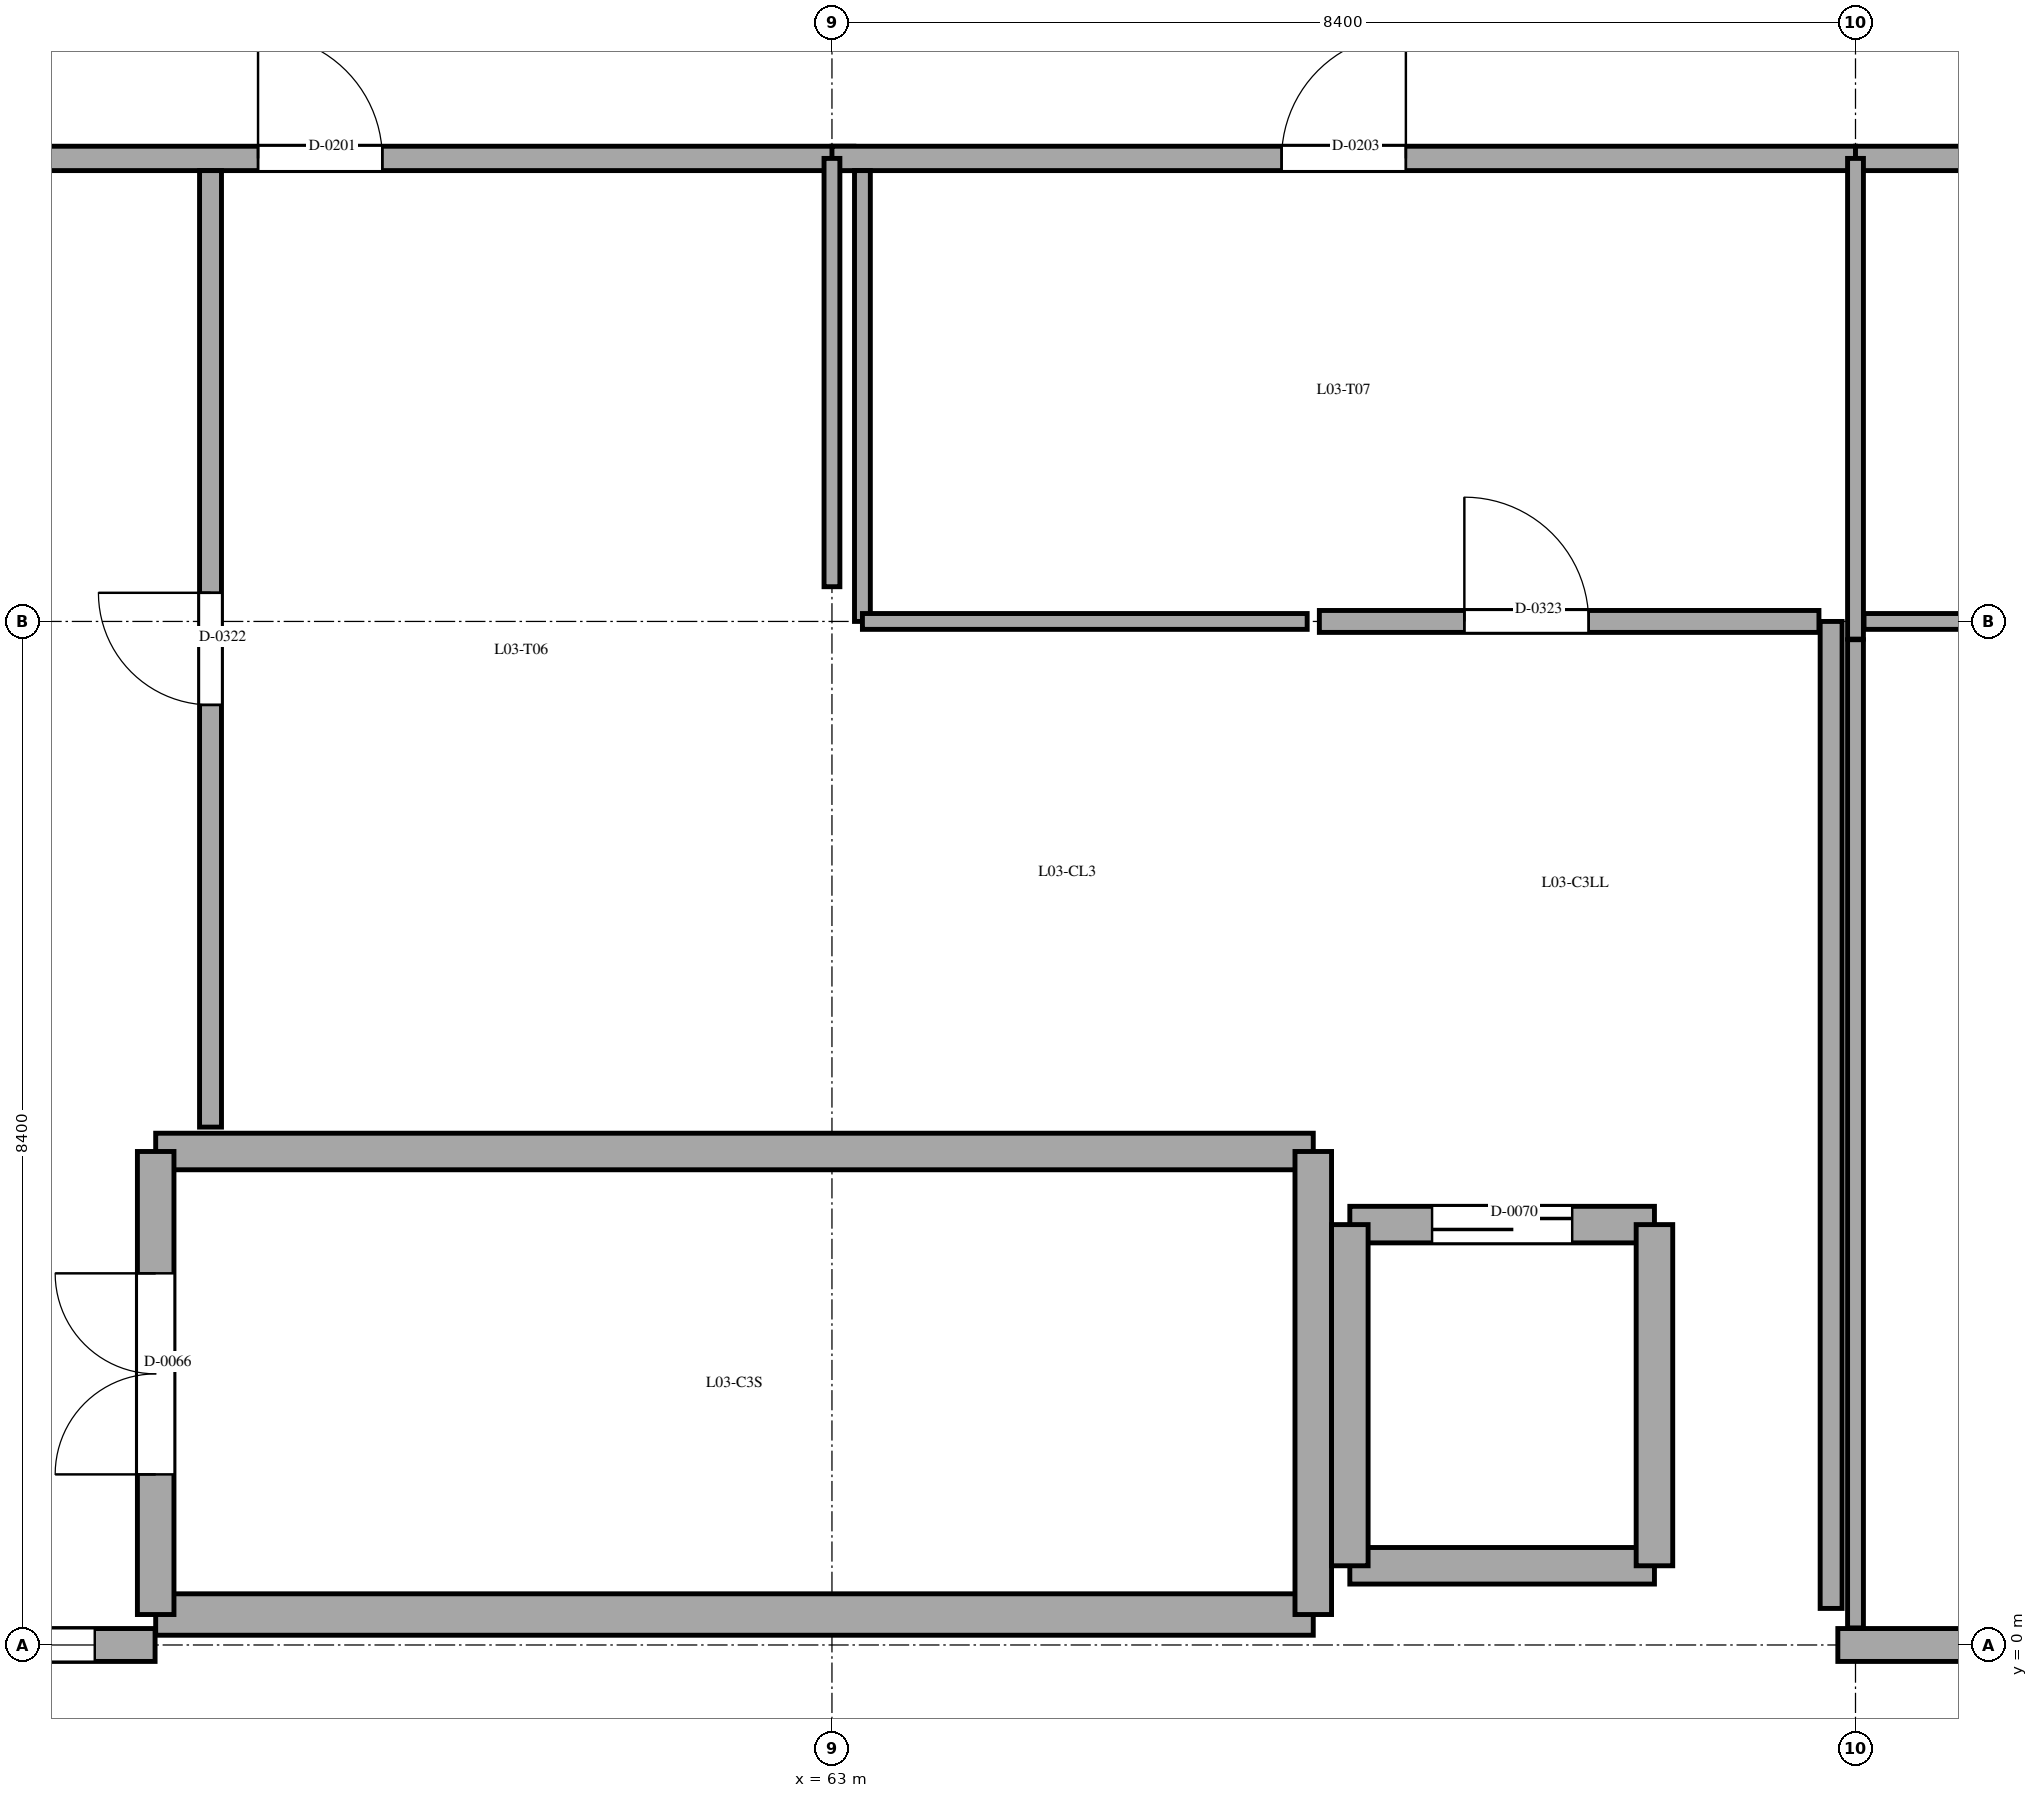
"""IFC4 building model, lengths in metres.
Left out: names, types, materials, properties, quantities, classifications, styles, units other than length and angle.
Written with IfcOpenShell. Run it as: python <this file> out.ifc"""

import sys

from ifc_helpers import new_model, si_unit, direction, frame, frame_2d, origin, origin_2d, place, context, subcontext, project, spatial, rectangle, i_section, extrude, element, fill, save


model = new_model("IFC4")
c1 = context("Model", 3, precision=1e-05, world=origin(), true_north=direction((0.0, 1.0)))
c2 = subcontext(c1, "Body", "Model", "MODEL_VIEW")
j1 = project(units=[si_unit("LENGTHUNIT", "METRE"), si_unit("PLANEANGLEUNIT", "RADIAN")], contexts=[c1])
p1 = place(None, origin())
s1 = spatial("IfcSite", under=j1, at=p1, CompositionType="ELEMENT")
p2 = place(p1, origin())
s2 = spatial("IfcBuilding", under=s1, at=p2, CompositionType="ELEMENT")
p3 = place(p2, frame((0.0, 0.0, 15.9)))
s3 = spatial("IfcBuildingStorey", under=s2, at=p3, CompositionType="ELEMENT", Elevation=15.9)
for number, where, z_axis, x_axis in (
    (1, (63.0, 0.0, 0.0), (0.0, 0.0, 1.0), (1.0, 0.0, 0.0)),
    (2, (63.0, 8.4, 0.0), (0.0, 0.0, 1.0), (1.0, 0.0, 0.0)),
):
    element("IfcColumn", number, at=place(p3, frame(where, z_axis=z_axis, x_axis=x_axis)), inside=s3, PredefinedType="COLUMN", context=c2, shape_type="SweptSolid", body=[
        extrude(rectangle(XDim=0.55, YDim=0.55, at=origin_2d()), origin(), (0.0, 0.0, 1.0), 3.9),
    ])
for number, where, z_axis, x_axis in (
    (3, (71.4, 0.0, 0.0), (0.0, 0.0, 1.0), (1.0, 0.0, 0.0)),
    (4, (71.4, 8.4, 0.0), (0.0, 0.0, 1.0), (1.0, 0.0, 0.0)),
):
    element("IfcColumn", number, at=place(p3, frame(where, z_axis=z_axis, x_axis=x_axis)), inside=s3, PredefinedType="COLUMN", context=c2, shape_type="SweptSolid", body=[
        extrude(i_section(OverallWidth=0.28, OverallDepth=0.28, WebThickness=0.01, FlangeThickness=0.018, FilletRadius=0.024, at=origin_2d()), origin(), (0.0, 0.0, 1.0), 3.9),
    ])
p4 = place(p3, frame((66.95, 0.25, 0.0), z_axis=(0.0, 0.0, 1.0), x_axis=(-1.0, 0.0, 0.0)))
e5 = element("IfcWall", 5, at=p4, inside=s3, PredefinedType="STANDARD", context=c2, shape_type="SweptSolid", body=[
    extrude(rectangle(XDim=9.5, YDim=0.34, at=frame_2d((4.75, 0.0))), origin(), (0.0, 0.0, 1.0), 3.3),
])
p5 = place(p3, frame((57.45, 4.05, 0.0), z_axis=(0.0, 0.0, 1.0), x_axis=(1.0, 0.0, 0.0)))
e6 = element("IfcWall", 6, at=p5, inside=s3, PredefinedType="SHEAR", context=c2, shape_type="SweptSolid", body=[
    extrude(rectangle(XDim=9.5, YDim=0.3, at=frame_2d((4.75, 0.0))), origin(), (0.0, 0.0, 1.0), 3.3),
])
p6 = place(p3, frame((57.45, 0.25, 0.0), z_axis=(0.0, 0.0, 1.0), x_axis=(0.0, 1.0, 0.0)))
e7 = element("IfcWall", 7, at=p6, inside=s3, PredefinedType="SHEAR", context=c2, shape_type="SweptSolid", body=[
    extrude(rectangle(XDim=3.8, YDim=0.3, at=frame_2d((1.9, 0.0))), origin(), (0.0, 0.0, 1.0), 3.3),
])
p7 = place(p6, frame((1.15, 0.0, 0.0)))
e8 = element("IfcOpeningElement", 8, at=p7, cuts=e7, PredefinedType="OPENING", context=c2, shape_type="SweptSolid", body=[
    extrude(rectangle(XDim=1.65, YDim=2.2, at=frame_2d((0.825, 1.1))), frame((0.0, 0.16, 0.0), z_axis=(0.0, -1.0, 0.0), x_axis=(1.0, 0.0, 0.0)), (0.0, 0.0, 1.0), 0.32),
])
p8 = place(p3, frame((66.95, 0.25, 0.0), z_axis=(0.0, 0.0, 1.0), x_axis=(0.0, 1.0, 0.0)))
e9 = element("IfcWall", 9, at=p8, inside=s3, PredefinedType="SHEAR", context=c2, shape_type="SweptSolid", body=[
    extrude(rectangle(XDim=3.8, YDim=0.3, at=frame_2d((1.9, 0.0))), origin(), (0.0, 0.0, 1.0), 3.3),
])
p9 = place(p3, frame((67.25, 0.65, 0.0), z_axis=(0.0, 0.0, 1.0), x_axis=(1.0, 0.0, 0.0)))
e10 = element("IfcWall", 10, at=p9, inside=s3, PredefinedType="SHEAR", context=c2, shape_type="SweptSolid", body=[
    extrude(rectangle(XDim=2.5, YDim=0.3, at=frame_2d((1.25, 0.0))), origin(), (0.0, 0.0, 1.0), 3.4),
])
p10 = place(p3, frame((67.25, 3.45, 0.0), z_axis=(0.0, 0.0, 1.0), x_axis=(1.0, 0.0, 0.0)))
e11 = element("IfcWall", 11, at=p10, inside=s3, PredefinedType="SHEAR", context=c2, shape_type="SweptSolid", body=[
    extrude(rectangle(XDim=2.5, YDim=0.3, at=frame_2d((1.25, 0.0))), origin(), (0.0, 0.0, 1.0), 3.4),
])
p11 = place(p10, frame((0.675, 0.0, 0.0)))
e12 = element("IfcOpeningElement", 12, at=p11, cuts=e11, PredefinedType="OPENING", context=c2, shape_type="SweptSolid", body=[
    extrude(rectangle(XDim=1.15, YDim=2.2, at=frame_2d((0.575, 1.1))), frame((0.0, 0.16, 0.0), z_axis=(0.0, -1.0, 0.0), x_axis=(1.0, 0.0, 0.0)), (0.0, 0.0, 1.0), 0.32),
])
for number, where, z_axis, x_axis in (
    (13, (67.25, 0.65, 0.0), (0.0, 0.0, 1.0), (0.0, 1.0, 0.0)),
    (14, (69.75, 0.65, 0.0), (0.0, 0.0, 1.0), (0.0, 1.0, 0.0)),
):
    element("IfcWall", number, at=place(p3, frame(where, z_axis=z_axis, x_axis=x_axis)), inside=s3, PredefinedType="SHEAR", context=c2, shape_type="SweptSolid", body=[
        extrude(rectangle(XDim=2.8, YDim=0.3, at=frame_2d((1.4, 0.0))), origin(), (0.0, 0.0, 1.0), 3.4),
    ])
p12 = place(p3, frame((57.445, 0.0, 0.0), z_axis=(0.0, 0.0, 1.0), x_axis=(-1.0, 0.0, 0.0)))
e15 = element("IfcWall", 15, at=p12, inside=s3, PredefinedType="STANDARD", context=c2, shape_type="SweptSolid", body=[
    extrude(rectangle(XDim=2.58, YDim=0.27, at=frame_2d((1.29, 0.0))), origin(), (0.0, 0.0, 1.0), 3.64),
])
p13 = place(p12, frame((0.495, 0.0, 0.95)))
e16 = element("IfcOpeningElement", 16, at=p13, cuts=e15, PredefinedType="OPENING", context=c2, shape_type="SweptSolid", body=[
    extrude(rectangle(XDim=1.5, YDim=1.6, at=frame_2d((0.75, 0.8))), frame((0.0, 0.145, 0.0), z_axis=(0.0, -1.0, 0.0), x_axis=(1.0, 0.0, 0.0)), (0.0, 0.0, 1.0), 0.29),
])
p14 = place(p3, frame((79.67, 0.0, 0.0), z_axis=(0.0, 0.0, 1.0), x_axis=(-1.0, 0.0, 0.0)))
e17 = element("IfcWall", 17, at=p14, inside=s3, PredefinedType="STANDARD", context=c2, shape_type="SweptSolid", body=[
    extrude(rectangle(XDim=8.415, YDim=0.27, at=frame_2d((4.208, 0.0))), origin(), (0.0, 0.0, 1.0), 3.64),
])
p15 = place(p14, frame((0.52, 0.0, 0.9)))
e18 = element("IfcOpeningElement", 18, at=p15, cuts=e17, PredefinedType="OPENING", context=c2, shape_type="SweptSolid", body=[
    extrude(rectangle(XDim=3.2, YDim=2.1, at=frame_2d((1.6, 1.05))), frame((0.0, 0.145, 0.0), z_axis=(0.0, -1.0, 0.0), x_axis=(1.0, 0.0, 0.0)), (0.0, 0.0, 1.0), 0.29),
])
p16 = place(p3, frame((54.6, 12.2, 0.0), z_axis=(0.0, 0.0, 1.0), x_axis=(1.0, 0.0, 0.0)))
e19 = element("IfcWall", 19, at=p16, inside=s3, PredefinedType="STANDARD", context=c2, shape_type="SweptSolid", body=[
    extrude(rectangle(XDim=8.58, YDim=0.2, at=frame_2d((4.29, 0.0))), origin(), (0.0, 0.0, 1.0), 2.9),
])
p17 = place(p16, frame((3.69, 0.0, 0.0)))
e20 = element("IfcOpeningElement", 20, at=p17, cuts=e19, PredefinedType="OPENING", context=c2, shape_type="SweptSolid", body=[
    extrude(rectangle(XDim=1.02, YDim=2.15, at=frame_2d((0.51, 1.075))), frame((0.0, 0.11, 0.0), z_axis=(0.0, -1.0, 0.0), x_axis=(1.0, 0.0, 0.0)), (0.0, 0.0, 1.0), 0.22),
])
p18 = place(p3, frame((63.0, 12.2, 0.0), z_axis=(0.0, 0.0, 1.0), x_axis=(1.0, 0.0, 0.0)))
e21 = element("IfcWall", 21, at=p18, inside=s3, PredefinedType="STANDARD", context=c2, shape_type="SweptSolid", body=[
    extrude(rectangle(XDim=8.4, YDim=0.2, at=frame_2d((4.2, 0.0))), origin(), (0.0, 0.0, 1.0), 2.9),
])
p19 = place(p18, frame((3.69, 0.0, 0.0)))
e22 = element("IfcOpeningElement", 22, at=p19, cuts=e21, PredefinedType="OPENING", context=c2, shape_type="SweptSolid", body=[
    extrude(rectangle(XDim=1.02, YDim=2.15, at=frame_2d((0.51, 1.075))), frame((0.0, 0.11, 0.0), z_axis=(0.0, -1.0, 0.0), x_axis=(1.0, 0.0, 0.0)), (0.0, 0.0, 1.0), 0.22),
])
p20 = place(p3, frame((71.4, 12.2, 0.0), z_axis=(0.0, 0.0, 1.0), x_axis=(1.0, 0.0, 0.0)))
e23 = element("IfcWall", 23, at=p20, inside=s3, PredefinedType="STANDARD", context=c2, shape_type="SweptSolid", body=[
    extrude(rectangle(XDim=4.3, YDim=0.2, at=frame_2d((2.15, 0.0))), origin(), (0.0, 0.0, 1.0), 2.9),
])
p21 = place(p20, frame((1.71, 0.0, 0.0)))
e24 = element("IfcOpeningElement", 24, at=p21, cuts=e23, PredefinedType="OPENING", context=c2, shape_type="SweptSolid", body=[
    extrude(rectangle(XDim=0.88, YDim=2.1, at=frame_2d((0.44, 1.05))), frame((0.0, 0.11, 0.0), z_axis=(0.0, -1.0, 0.0), x_axis=(1.0, 0.0, 0.0)), (0.0, 0.0, 1.0), 0.22),
])
p22 = place(p3, frame((63.0, 8.685, 0.0), z_axis=(0.0, 0.0, 1.0), x_axis=(0.0, 1.0, 0.0)))
e25 = element("IfcWall", 25, at=p22, inside=s3, PredefinedType="STANDARD", context=c2, shape_type="SweptSolid", body=[
    extrude(rectangle(XDim=3.515, YDim=0.13, at=frame_2d((1.757, 0.0))), origin(), (0.0, 0.0, 1.0), 2.9),
])
p23 = place(p3, frame((71.4, 0.14, 0.0), z_axis=(0.0, 0.0, 1.0), x_axis=(0.0, 1.0, 0.0)))
e26 = element("IfcWall", 26, at=p23, inside=s3, PredefinedType="STANDARD", context=c2, shape_type="SweptSolid", body=[
    extrude(rectangle(XDim=8.11, YDim=0.13, at=frame_2d((4.055, 0.0))), origin(), (0.0, 0.0, 1.0), 2.9),
])
p24 = place(p3, frame((71.4, 8.255, 0.0), z_axis=(0.0, 0.0, 1.0), x_axis=(0.0, 1.0, 0.0)))
e27 = element("IfcWall", 27, at=p24, inside=s3, PredefinedType="STANDARD", context=c2, shape_type="SweptSolid", body=[
    extrude(rectangle(XDim=3.945, YDim=0.13, at=frame_2d((1.973, 0.0))), origin(), (0.0, 0.0, 1.0), 2.9),
])
p25 = place(p3, frame((63.25, 8.4, 0.0), z_axis=(0.0, 0.0, 1.0), x_axis=(0.0, 1.0, 0.0)))
e28 = element("IfcWall", 28, at=p25, inside=s3, PredefinedType="STANDARD", context=c2, shape_type="SweptSolid", body=[
    extrude(rectangle(XDim=3.7, YDim=0.13, at=frame_2d((1.85, 0.0))), origin(), (0.0, 0.0, 1.0), 2.9),
])
p26 = place(p3, frame((63.25, 8.4, 0.0), z_axis=(0.0, 0.0, 1.0), x_axis=(1.0, 0.0, 0.0)))
e29 = element("IfcWall", 29, at=p26, inside=s3, PredefinedType="STANDARD", context=c2, shape_type="SweptSolid", body=[
    extrude(rectangle(XDim=3.65, YDim=0.13, at=frame_2d((1.825, 0.0))), origin(), (0.0, 0.0, 1.0), 2.9),
])
p27 = place(p3, frame((71.47, 8.4, 0.0), z_axis=(0.0, 0.0, 1.0), x_axis=(1.0, 0.0, 0.0)))
e30 = element("IfcWall", 30, at=p27, inside=s3, PredefinedType="STANDARD", context=c2, shape_type="SweptSolid", body=[
    extrude(rectangle(XDim=8.19, YDim=0.13, at=frame_2d((4.095, 0.0))), origin(), (0.0, 0.0, 1.0), 2.9),
])
p28 = place(p3, frame((57.9, 4.25, 0.0), z_axis=(0.0, 0.0, 1.0), x_axis=(0.0, 1.0, 0.0)))
e31 = element("IfcWall", 31, at=p28, inside=s3, PredefinedType="STANDARD", context=c2, shape_type="SweptSolid", body=[
    extrude(rectangle(XDim=7.85, YDim=0.18, at=frame_2d((3.925, 0.0))), origin(), (0.0, 0.0, 1.0), 2.9),
])
p29 = place(p28, frame((3.465, 0.0, 0.0)))
e32 = element("IfcOpeningElement", 32, at=p29, cuts=e31, PredefinedType="OPENING", context=c2, shape_type="SweptSolid", body=[
    extrude(rectangle(XDim=0.92, YDim=2.15, at=frame_2d((0.46, 1.075))), frame((0.0, 0.1, 0.0), z_axis=(0.0, -1.0, 0.0), x_axis=(1.0, 0.0, 0.0)), (0.0, 0.0, 1.0), 0.2),
])
p30 = place(p3, frame((67.0, 8.4, 0.0), z_axis=(0.0, 0.0, 1.0), x_axis=(1.0, 0.0, 0.0)))
e33 = element("IfcWall", 33, at=p30, inside=s3, PredefinedType="STANDARD", context=c2, shape_type="SweptSolid", body=[
    extrude(rectangle(XDim=4.1, YDim=0.18, at=frame_2d((2.05, 0.0))), origin(), (0.0, 0.0, 1.0), 2.9),
])
p31 = place(p30, frame((1.19, 0.0, 0.0)))
e34 = element("IfcOpeningElement", 34, at=p31, cuts=e33, PredefinedType="OPENING", context=c2, shape_type="SweptSolid", body=[
    extrude(rectangle(XDim=1.02, YDim=2.15, at=frame_2d((0.51, 1.075))), frame((0.0, 0.1, 0.0), z_axis=(0.0, -1.0, 0.0), x_axis=(1.0, 0.0, 0.0)), (0.0, 0.0, 1.0), 0.2),
])
p32 = place(p3, frame((71.2, 0.3, 0.0), z_axis=(0.0, 0.0, 1.0), x_axis=(0.0, 1.0, 0.0)))
e35 = element("IfcWall", 35, at=p32, inside=s3, PredefinedType="STANDARD", context=c2, shape_type="SweptSolid", body=[
    extrude(rectangle(XDim=8.1, YDim=0.18, at=frame_2d((4.05, 0.0))), origin(), (0.0, 0.0, 1.0), 2.9),
])
p33 = place(p13, origin())
e36 = element("IfcWindow", 36, at=p33, inside=s3, PartitioningType="SINGLE_PANEL", PredefinedType="WINDOW", context=c2, shape_type="SweptSolid", body=[
    extrude(rectangle(XDim=1.5, YDim=1.6, at=frame_2d((0.75, 0.8))), frame((0.0, 0.03, 0.0), z_axis=(0.0, -1.0, 0.0), x_axis=(1.0, 0.0, 0.0)), (0.0, 0.0, 1.0), 0.06),
])
fill(e16, e36)
p34 = place(p7, origin())
e37 = element("IfcDoor", 37, at=p34, inside=s3, OperationType="DOUBLE_DOOR_SINGLE_SWING", PredefinedType="DOOR", context=c2, shape_type="SweptSolid", body=[
    extrude(rectangle(XDim=1.65, YDim=2.2, at=frame_2d((0.825, 1.1))), frame((0.0, 0.025, 0.0), z_axis=(0.0, -1.0, 0.0), x_axis=(1.0, 0.0, 0.0)), (0.0, 0.0, 1.0), 0.05),
])
fill(e8, e37)
p35 = place(p11, origin())
e38 = element("IfcDoor", 38, at=p35, inside=s3, OperationType="DOUBLE_DOOR_SLIDING", PredefinedType="DOOR", context=c2, shape_type="SweptSolid", body=[
    extrude(rectangle(XDim=1.15, YDim=2.2, at=frame_2d((0.575, 1.1))), frame((0.0, 0.025, 0.0), z_axis=(0.0, -1.0, 0.0), x_axis=(1.0, 0.0, 0.0)), (0.0, 0.0, 1.0), 0.05),
])
fill(e12, e38)
p36 = place(p17, origin())
e39 = element("IfcDoor", 39, at=p36, inside=s3, OperationType="SINGLE_SWING_LEFT", PredefinedType="DOOR", context=c2, shape_type="SweptSolid", body=[
    extrude(rectangle(XDim=1.02, YDim=2.15, at=frame_2d((0.51, 1.075))), frame((0.0, 0.025, 0.0), z_axis=(0.0, -1.0, 0.0), x_axis=(1.0, 0.0, 0.0)), (0.0, 0.0, 1.0), 0.05),
])
fill(e20, e39)
p37 = place(p19, origin())
e40 = element("IfcDoor", 40, at=p37, inside=s3, OperationType="SINGLE_SWING_RIGHT", PredefinedType="DOOR", context=c2, shape_type="SweptSolid", body=[
    extrude(rectangle(XDim=1.02, YDim=2.15, at=frame_2d((0.51, 1.075))), frame((0.0, 0.025, 0.0), z_axis=(0.0, -1.0, 0.0), x_axis=(1.0, 0.0, 0.0)), (0.0, 0.0, 1.0), 0.05),
])
fill(e22, e40)
p38 = place(p29, origin())
e41 = element("IfcDoor", 41, at=p38, inside=s3, OperationType="SINGLE_SWING_RIGHT", PredefinedType="DOOR", context=c2, shape_type="SweptSolid", body=[
    extrude(rectangle(XDim=0.92, YDim=2.15, at=frame_2d((0.46, 1.075))), frame((0.0, 0.025, 0.0), z_axis=(0.0, -1.0, 0.0), x_axis=(1.0, 0.0, 0.0)), (0.0, 0.0, 1.0), 0.05),
])
fill(e32, e41)
p39 = place(p31, origin())
e42 = element("IfcDoor", 42, at=p39, inside=s3, OperationType="SINGLE_SWING_LEFT", PredefinedType="DOOR", context=c2, shape_type="SweptSolid", body=[
    extrude(rectangle(XDim=1.02, YDim=2.15, at=frame_2d((0.51, 1.075))), frame((0.0, 0.025, 0.0), z_axis=(0.0, -1.0, 0.0), x_axis=(1.0, 0.0, 0.0)), (0.0, 0.0, 1.0), 0.05),
])
fill(e34, e42)
save(model, sys.argv[1])
